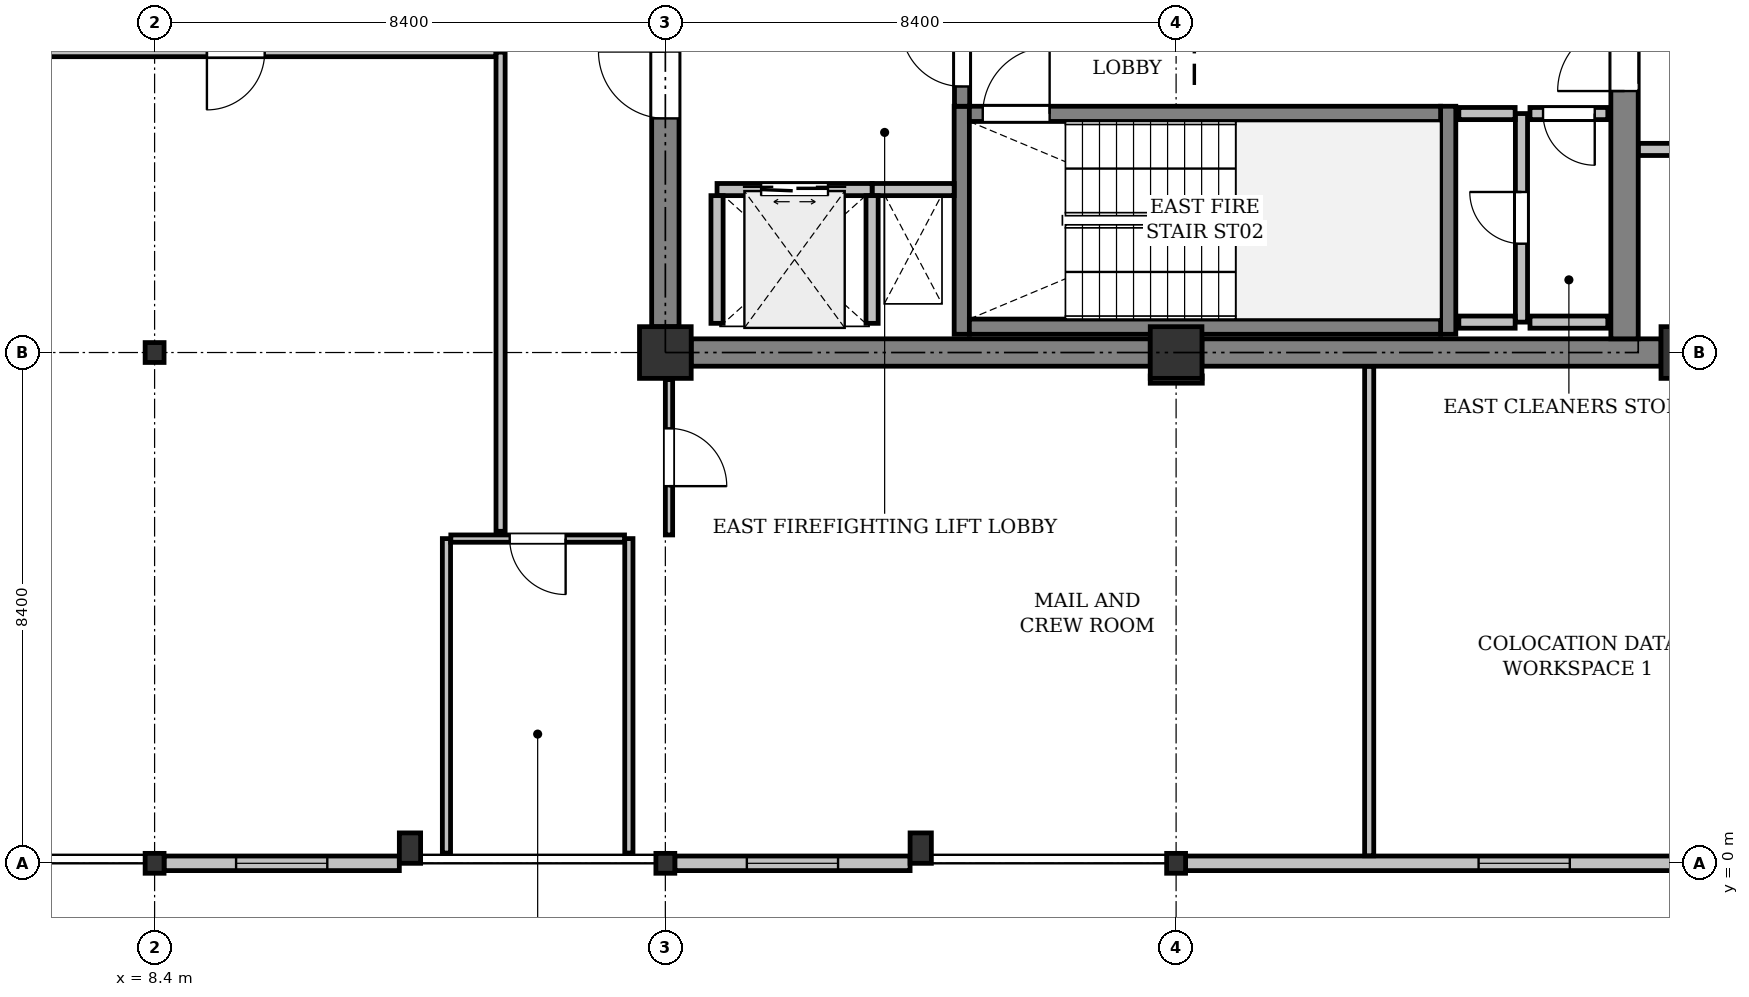
"""IFC4 building model, lengths in metres.
Left out: names, types, materials, properties, quantities, classifications, styles, units other than length and angle.
Written with IfcOpenShell. Run it as: python <this file> out.ifc"""

import sys

from ifc_helpers import new_model, si_unit, direction, frame, frame_2d, origin, origin_2d, place, context, subcontext, project, spatial, rectangle, i_section, extrude, element, fill, save


model = new_model("IFC4")
c1 = context("Model", 3, precision=1e-05, world=origin(), true_north=direction((0.0, 1.0)))
c2 = subcontext(c1, "Body", "Model", "MODEL_VIEW")
j1 = project(units=[si_unit("LENGTHUNIT", "METRE"), si_unit("PLANEANGLEUNIT", "RADIAN")], contexts=[c1])
p1 = place(None, origin())
s1 = spatial("IfcSite", under=j1, at=p1, CompositionType="ELEMENT")
p2 = place(p1, origin())
s2 = spatial("IfcBuilding", under=s1, at=p2, CompositionType="ELEMENT")
p3 = place(p2, frame((0.0, 0.0, 245.2)))
s3 = spatial("IfcBuildingStorey", under=s2, at=p3, CompositionType="ELEMENT", Elevation=245.2)
for number, where, z_axis, x_axis in (
    (1, (8.4, 0.0, 0.0), (0.0, 0.0, 1.0), (1.0, 0.0, 0.0)),
    (2, (8.4, 8.4, 0.0), (0.0, 0.0, 1.0), (1.0, 0.0, 0.0)),
    (3, (16.8, 0.0, 0.0), (0.0, 0.0, 1.0), (1.0, 0.0, 0.0)),
):
    element("IfcColumn", number, at=place(p3, frame(where, z_axis=z_axis, x_axis=x_axis)), inside=s3, PredefinedType="COLUMN", context=c2, shape_type="SweptSolid", body=[
        extrude(i_section(OverallWidth=0.35, OverallDepth=0.35, WebThickness=0.02, FlangeThickness=0.032, at=origin_2d()), origin(), (0.0, 0.0, 1.0), 5.0),
    ])
p4 = place(p3, frame((16.8, 8.4, 0.0), z_axis=(0.0, 0.0, 1.0), x_axis=(1.0, 0.0, 0.0)))
e4 = element("IfcColumn", 4, at=p4, inside=s3, PredefinedType="COLUMN", context=c2, shape_type="SweptSolid", body=[
    extrude(rectangle(XDim=1.0, YDim=1.0, at=origin_2d()), origin(), (0.0, 0.0, 1.0), 5.0),
])
p5 = place(p3, frame((25.2, 0.0, 0.0), z_axis=(0.0, 0.0, 1.0), x_axis=(1.0, 0.0, 0.0)))
e5 = element("IfcColumn", 5, at=p5, inside=s3, PredefinedType="COLUMN", context=c2, shape_type="SweptSolid", body=[
    extrude(i_section(OverallWidth=0.35, OverallDepth=0.35, WebThickness=0.02, FlangeThickness=0.032, at=origin_2d()), origin(), (0.0, 0.0, 1.0), 5.0),
])
for number, where, z_axis, x_axis in (
    (6, (25.2, 8.4, 0.0), (0.0, 0.0, 1.0), (1.0, 0.0, 0.0)),
    (7, (33.6, 8.4, 0.0), (0.0, 0.0, 1.0), (1.0, 0.0, 0.0)),
):
    element("IfcColumn", number, at=place(p3, frame(where, z_axis=z_axis, x_axis=x_axis)), inside=s3, PredefinedType="COLUMN", context=c2, shape_type="SweptSolid", body=[
        extrude(rectangle(XDim=1.0, YDim=1.0, at=origin_2d()), origin(), (0.0, 0.0, 1.0), 5.0),
    ])
for number, where, z_axis, x_axis in (
    (8, (12.6, 0.25, 0.0), (0.0, 0.0, 1.0), (1.0, 0.0, 0.0)),
    (9, (21.0, 0.25, 0.0), (0.0, 0.0, 1.0), (1.0, 0.0, 0.0)),
):
    element("IfcColumn", number, at=place(p3, frame(where, z_axis=z_axis, x_axis=x_axis)), inside=s3, PredefinedType="PILASTER", context=c2, shape_type="SweptSolid", body=[
        extrude(rectangle(XDim=0.35, YDim=0.5, at=origin_2d()), origin(), (0.0, 0.0, 1.0), 5.0),
    ])
p6 = place(p3, frame((33.425, 0.0, 0.0), z_axis=(0.0, 0.0, 1.0), x_axis=(-1.0, 0.0, 0.0)))
e10 = element("IfcWall", 10, at=p6, inside=s3, PredefinedType="STANDARD", context=c2, shape_type="SweptSolid", body=[
    extrude(rectangle(XDim=8.05, YDim=0.24, at=frame_2d((4.025, 0.0))), origin(), (0.0, 0.0, 1.0), 4.425),
])
for number, where, z_axis, x_axis in (
    (11, (25.025, 0.0, 0.0), (0.0, 0.0, 1.0), (-1.0, 0.0, 0.0)),
    (12, (20.825, 0.0, 0.0), (0.0, 0.0, 1.0), (-1.0, 0.0, 0.0)),
):
    element("IfcWall", number, at=place(p3, frame(where, z_axis=z_axis, x_axis=x_axis)), inside=s3, PredefinedType="STANDARD", context=c2, shape_type="SweptSolid", body=[
        extrude(rectangle(XDim=3.85, YDim=0.24, at=frame_2d((1.925, 0.0))), origin(), (0.0, 0.0, 1.0), 4.425),
    ])
for number, where, z_axis, x_axis in (
    (13, (16.625, 0.0, 0.0), (0.0, 0.0, 1.0), (-1.0, 0.0, 0.0)),
    (14, (12.425, 0.0, 0.0), (0.0, 0.0, 1.0), (-1.0, 0.0, 0.0)),
):
    element("IfcWall", number, at=place(p3, frame(where, z_axis=z_axis, x_axis=x_axis)), inside=s3, PredefinedType="STANDARD", context=c2, shape_type="SweptSolid", body=[
        extrude(rectangle(XDim=3.85, YDim=0.24, at=frame_2d((1.925, 0.0))), origin(), (0.0, 0.0, 1.0), 4.425),
    ])
p7 = place(p3, frame((8.225, 0.0, 0.0), z_axis=(0.0, 0.0, 1.0), x_axis=(-1.0, 0.0, 0.0)))
e15 = element("IfcWall", 15, at=p7, inside=s3, PredefinedType="STANDARD", context=c2, shape_type="SweptSolid", body=[
    extrude(rectangle(XDim=4.145, YDim=0.24, at=frame_2d((2.073, 0.0))), origin(), (0.0, 0.0, 1.0), 4.725),
])
p8 = place(p3, frame((17.3, 8.4, 0.0), z_axis=(0.0, 0.0, 1.0), x_axis=(1.0, 0.0, 0.0)))
e16 = element("IfcWall", 16, at=p8, inside=s3, PredefinedType="SHEAR", context=c2, shape_type="SweptSolid", body=[
    extrude(rectangle(XDim=7.4, YDim=0.45, at=frame_2d((3.7, 0.0))), origin(), (0.0, 0.0, 1.0), 4.725),
])
p9 = place(p3, frame((25.7, 8.4, 0.0), z_axis=(0.0, 0.0, 1.0), x_axis=(1.0, 0.0, 0.0)))
e17 = element("IfcWall", 17, at=p9, inside=s3, PredefinedType="SHEAR", context=c2, shape_type="SweptSolid", body=[
    extrude(rectangle(XDim=7.4, YDim=0.45, at=frame_2d((3.7, 0.0))), origin(), (0.0, 0.0, 1.0), 4.725),
])
p10 = place(p3, frame((32.575, 8.625, 0.0), z_axis=(0.0, 0.0, 1.0), x_axis=(0.0, 1.0, 0.0)))
e18 = element("IfcWall", 18, at=p10, inside=s3, PredefinedType="SHEAR", context=c2, shape_type="SweptSolid", body=[
    extrude(rectangle(XDim=7.95, YDim=0.45, at=frame_2d((3.975, 0.0))), origin(), (0.0, 0.0, 1.0), 4.725),
])
p11 = place(p10, frame((4.075, 0.0, 0.0)))
e19 = element("IfcOpeningElement", 19, at=p11, cuts=e18, PredefinedType="OPENING", context=c2, shape_type="SweptSolid", body=[
    extrude(rectangle(XDim=1.1, YDim=2.15, at=frame_2d((0.55, 1.075))), frame((0.0, 0.235, 0.0), z_axis=(0.0, -1.0, 0.0), x_axis=(1.0, 0.0, 0.0)), (0.0, 0.0, 1.0), 0.47),
])
p12 = place(p3, frame((16.8, 8.9, 0.0), z_axis=(0.0, 0.0, 1.0), x_axis=(0.0, 1.0, 0.0)))
e20 = element("IfcWall", 20, at=p12, inside=s3, PredefinedType="SHEAR", context=c2, shape_type="SweptSolid", body=[
    extrude(rectangle(XDim=7.4, YDim=0.45, at=frame_2d((3.7, 0.0))), origin(), (0.0, 0.0, 1.0), 4.725),
])
p13 = place(p12, frame((3.35, 0.0, 0.0)))
e21 = element("IfcOpeningElement", 21, at=p13, cuts=e20, PredefinedType="OPENING", context=c2, shape_type="SweptSolid", body=[
    extrude(rectangle(XDim=1.1, YDim=2.15, at=frame_2d((0.55, 1.075))), frame((0.0, 0.235, 0.0), z_axis=(0.0, -1.0, 0.0), x_axis=(1.0, 0.0, 0.0)), (0.0, 0.0, 1.0), 0.47),
])
for number, where, z_axis, x_axis in (
    (22, (21.675, 8.7, 0.0), (0.0, 0.0, 1.0), (0.0, 1.0, 0.0)),
    (23, (29.675, 8.7, 0.0), (0.0, 0.0, 1.0), (0.0, 1.0, 0.0)),
):
    element("IfcWall", number, at=place(p3, frame(where, z_axis=z_axis, x_axis=x_axis)), inside=s3, PredefinedType="SHEAR", context=c2, shape_type="SweptSolid", body=[
        extrude(rectangle(XDim=3.75, YDim=0.25, at=frame_2d((1.875, 0.0))), origin(), (0.0, 0.0, 1.0), 4.725),
    ])
p14 = place(p3, frame((21.8, 8.825, 0.0), z_axis=(0.0, 0.0, 1.0), x_axis=(1.0, 0.0, 0.0)))
e24 = element("IfcWall", 24, at=p14, inside=s3, PredefinedType="SHEAR", context=c2, shape_type="SweptSolid", body=[
    extrude(rectangle(XDim=7.75, YDim=0.25, at=frame_2d((3.875, 0.0))), origin(), (0.0, 0.0, 1.0), 4.725),
])
p15 = place(p3, frame((21.8, 12.325, 0.0), z_axis=(0.0, 0.0, 1.0), x_axis=(1.0, 0.0, 0.0)))
e25 = element("IfcWall", 25, at=p15, inside=s3, PredefinedType="SHEAR", context=c2, shape_type="SweptSolid", body=[
    extrude(rectangle(XDim=7.75, YDim=0.25, at=frame_2d((3.875, 0.0))), origin(), (0.0, 0.0, 1.0), 4.725),
])
p16 = place(p15, frame((0.22, 0.0, 0.0)))
e26 = element("IfcOpeningElement", 26, at=p16, cuts=e25, PredefinedType="OPENING", context=c2, shape_type="SweptSolid", body=[
    extrude(rectangle(XDim=1.1, YDim=2.15, at=frame_2d((0.55, 1.075))), frame((0.0, 0.135, 0.0), z_axis=(0.0, -1.0, 0.0), x_axis=(1.0, 0.0, 0.0)), (0.0, 0.0, 1.0), 0.27),
])
p17 = place(p3, frame((20.2, 11.08, 0.0), z_axis=(0.0, 0.0, 1.0), x_axis=(1.0, 0.0, 0.0)))
e27 = element("IfcWall", 27, at=p17, inside=s3, PredefinedType="PARTITIONING", context=c2, shape_type="SweptSolid", body=[
    extrude(rectangle(XDim=1.35, YDim=0.2, at=frame_2d((0.675, 0.0))), origin(), (0.0, 0.0, 1.0), 4.725),
])
p18 = place(p3, frame((21.68, 12.45, 0.0), z_axis=(0.0, 0.0, 1.0), x_axis=(0.0, 1.0, 0.0)))
e28 = element("IfcWall", 28, at=p18, inside=s3, PredefinedType="SHEAR", context=c2, shape_type="SweptSolid", body=[
    extrude(rectangle(XDim=1.65, YDim=0.25, at=frame_2d((0.825, 0.0))), origin(), (0.0, 0.0, 1.0), 4.725),
])
p19 = place(p18, frame((0.325, 0.0, 0.0)))
e29 = element("IfcOpeningElement", 29, at=p19, cuts=e28, PredefinedType="OPENING", context=c2, shape_type="SweptSolid", body=[
    extrude(rectangle(XDim=1.0, YDim=2.15, at=frame_2d((0.5, 1.075))), frame((0.0, 0.135, 0.0), z_axis=(0.0, -1.0, 0.0), x_axis=(1.0, 0.0, 0.0)), (0.0, 0.0, 1.0), 0.27),
])
p20 = place(p3, frame((17.65, 11.08, 0.0), z_axis=(0.0, 0.0, 1.0), x_axis=(1.0, 0.0, 0.0)))
e30 = element("IfcWall", 30, at=p20, inside=s3, PredefinedType="PARTITIONING", context=c2, shape_type="SweptSolid", body=[
    extrude(rectangle(XDim=2.55, YDim=0.2, at=frame_2d((1.275, 0.0))), origin(), (0.0, 0.0, 1.0), 4.725),
])
p21 = place(p20, frame((0.725, 0.0, 0.0)))
e31 = element("IfcOpeningElement", 31, at=p21, cuts=e30, PredefinedType="OPENING", context=c2, shape_type="SweptSolid", body=[
    extrude(rectangle(XDim=1.1, YDim=2.2, at=frame_2d((0.55, 1.1))), frame((0.0, 0.11, 0.0), z_axis=(0.0, -1.0, 0.0), x_axis=(1.0, 0.0, 0.0)), (0.0, 0.0, 1.0), 0.22),
])
for number, where, z_axis, x_axis in (
    (32, (20.2, 8.88, 0.0), (0.0, 0.0, 1.0), (0.0, 1.0, 0.0)),
    (33, (17.65, 8.88, 0.0), (0.0, 0.0, 1.0), (0.0, 1.0, 0.0)),
):
    element("IfcWall", number, at=place(p3, frame(where, z_axis=z_axis, x_axis=x_axis)), inside=s3, PredefinedType="PARTITIONING", context=c2, shape_type="SweptSolid", body=[
        extrude(rectangle(XDim=2.1, YDim=0.2, at=frame_2d((1.05, 0.0))), origin(), (0.0, 0.0, 1.0), 4.725),
    ])
p22 = place(p3, frame((32.3, 12.33, 0.0), z_axis=(0.0, 0.0, 1.0), x_axis=(-1.0, 0.0, 0.0)))
e34 = element("IfcWall", 34, at=p22, inside=s3, PredefinedType="PARTITIONING", context=c2, shape_type="SweptSolid", body=[
    extrude(rectangle(XDim=2.45, YDim=0.2, at=frame_2d((1.225, 0.0))), origin(), (0.0, 0.0, 1.0), 4.725),
])
p23 = place(p22, frame((0.8, 0.0, 0.0)))
e35 = element("IfcOpeningElement", 35, at=p23, cuts=e34, PredefinedType="OPENING", context=c2, shape_type="SweptSolid", body=[
    extrude(rectangle(XDim=0.85, YDim=2.15, at=frame_2d((0.425, 1.075))), frame((0.0, 0.11, 0.0), z_axis=(0.0, -1.0, 0.0), x_axis=(1.0, 0.0, 0.0)), (0.0, 0.0, 1.0), 0.22),
])
p24 = place(p3, frame((29.85, 8.9, 0.0), z_axis=(0.0, 0.0, 1.0), x_axis=(1.0, 0.0, 0.0)))
e36 = element("IfcWall", 36, at=p24, inside=s3, PredefinedType="PARTITIONING", context=c2, shape_type="SweptSolid", body=[
    extrude(rectangle(XDim=2.45, YDim=0.2, at=frame_2d((1.225, 0.0))), origin(), (0.0, 0.0, 1.0), 4.725),
])
p25 = place(p3, frame((14.312, 0.124, 0.0), z_axis=(0.0, 0.0, 1.0), x_axis=(0.0, 1.0, 0.0)))
e37 = element("IfcWall", 37, at=p25, inside=s3, PredefinedType="PARTITIONING", context=c2, shape_type="SweptSolid", body=[
    extrude(rectangle(XDim=5.216, YDim=0.2, at=frame_2d((2.608, 0.0))), origin(), (0.0, 0.0, 1.0), 4.725),
])
p26 = place(p3, frame((14.208, 5.34, 0.0), z_axis=(0.0, 0.0, 1.0), x_axis=(-1.0, 0.0, 0.0)))
e38 = element("IfcWall", 38, at=p26, inside=s3, PredefinedType="PARTITIONING", context=c2, shape_type="SweptSolid", body=[
    extrude(rectangle(XDim=8.808, YDim=0.2, at=frame_2d((4.404, 0.0))), origin(), (0.0, 0.0, 1.0), 3.709),
])
p27 = place(p3, frame((35.6, 5.34, 0.0), z_axis=(0.0, 0.0, 1.0), x_axis=(-1.0, 0.0, 0.0)))
e39 = element("IfcWall", 39, at=p27, inside=s3, PredefinedType="PARTITIONING", context=c2, shape_type="SweptSolid", body=[
    extrude(rectangle(XDim=7.494, YDim=0.2, at=frame_2d((3.747, 0.0))), origin(), (0.0, 0.0, 1.0), 3.709),
])
p28 = place(p3, frame((28.106, 5.236, 0.0), z_axis=(0.0, 0.0, 1.0), x_axis=(0.0, -1.0, 0.0)))
e40 = element("IfcWall", 40, at=p28, inside=s3, PredefinedType="PARTITIONING", context=c2, shape_type="SweptSolid", body=[
    extrude(rectangle(XDim=5.112, YDim=0.2, at=frame_2d((2.556, 0.0))), origin(), (0.0, 0.0, 1.0), 4.725),
])
p29 = place(p3, frame((28.086, 5.34, 0.0), z_axis=(0.0, 0.0, 1.0), x_axis=(-1.0, 0.0, 0.0)))
e41 = element("IfcWall", 41, at=p29, inside=s3, PredefinedType="PARTITIONING", context=c2, shape_type="SweptSolid", body=[
    extrude(rectangle(XDim=13.67, YDim=0.2, at=frame_2d((6.835, 0.0))), origin(), (0.0, 0.0, 1.0), 3.709),
])
p30 = place(p29, frame((6.335, 0.0, 0.0)))
e42 = element("IfcOpeningElement", 42, at=p30, cuts=e41, PredefinedType="OPENING", context=c2, shape_type="SweptSolid", body=[
    extrude(rectangle(XDim=1.0, YDim=2.15, at=frame_2d((0.5, 1.075))), frame((0.0, 0.11, 0.0), z_axis=(0.0, -1.0, 0.0), x_axis=(1.0, 0.0, 0.0)), (0.0, 0.0, 1.0), 0.22),
])
p31 = place(p3, frame((14.09, 11.052, 0.0), z_axis=(0.0, 0.0, 1.0), x_axis=(-1.0, 0.0, 0.0)))
e43 = element("IfcWall", 43, at=p31, inside=s3, PredefinedType="PARTITIONING", context=c2, shape_type="SweptSolid", body=[
    extrude(rectangle(XDim=6.38, YDim=0.2, at=frame_2d((3.19, 0.0))), origin(), (0.0, 0.0, 1.0), 3.709),
])
p32 = place(p3, frame((7.71, 10.948, 0.0), z_axis=(0.0, 0.0, 1.0), x_axis=(0.0, -1.0, 0.0)))
e44 = element("IfcWall", 44, at=p32, inside=s3, PredefinedType="PARTITIONING", context=c2, shape_type="SweptSolid", body=[
    extrude(rectangle(XDim=3.238, YDim=0.2, at=frame_2d((1.619, 0.0))), origin(), (0.0, 0.0, 1.0), 3.825),
])
p33 = place(p3, frame((7.814, 7.71, 0.0), z_axis=(0.0, 0.0, 1.0), x_axis=(1.0, 0.0, 0.0)))
e45 = element("IfcWall", 45, at=p33, inside=s3, PredefinedType="PARTITIONING", context=c2, shape_type="SweptSolid", body=[
    extrude(rectangle(XDim=6.276, YDim=0.2, at=frame_2d((3.138, 0.0))), origin(), (0.0, 0.0, 1.0), 3.709),
])
p34 = place(p33, frame((2.638, 0.0, 0.0)))
e46 = element("IfcOpeningElement", 46, at=p34, cuts=e45, PredefinedType="OPENING", context=c2, shape_type="SweptSolid", body=[
    extrude(rectangle(XDim=1.0, YDim=2.15, at=frame_2d((0.5, 1.075))), frame((0.0, 0.11, 0.0), z_axis=(0.0, -1.0, 0.0), x_axis=(1.0, 0.0, 0.0)), (0.0, 0.0, 1.0), 0.22),
])
p35 = place(p3, frame((14.09, 7.814, 0.0), z_axis=(0.0, 0.0, 1.0), x_axis=(0.0, 1.0, 0.0)))
e47 = element("IfcWall", 47, at=p35, inside=s3, PredefinedType="PARTITIONING", context=c2, shape_type="SweptSolid", body=[
    extrude(rectangle(XDim=3.134, YDim=0.2, at=frame_2d((1.567, 0.0))), origin(), (0.0, 0.0, 1.0), 3.825),
])
p36 = place(p3, frame((7.71, 14.192, 0.0), z_axis=(0.0, 0.0, 1.0), x_axis=(0.0, -1.0, 0.0)))
e48 = element("IfcWall", 48, at=p36, inside=s3, PredefinedType="PARTITIONING", context=c2, shape_type="SweptSolid", body=[
    extrude(rectangle(XDim=3.036, YDim=0.2, at=frame_2d((1.518, 0.0))), origin(), (0.0, 0.0, 1.0), 4.725),
])
p37 = place(p36, frame((1.018, 0.0, 0.0)))
e49 = element("IfcOpeningElement", 49, at=p37, cuts=e48, PredefinedType="OPENING", context=c2, shape_type="SweptSolid", body=[
    extrude(rectangle(XDim=1.0, YDim=2.15, at=frame_2d((0.5, 1.075))), frame((0.0, 0.11, 0.0), z_axis=(0.0, -1.0, 0.0), x_axis=(1.0, 0.0, 0.0)), (0.0, 0.0, 1.0), 0.22),
])
p38 = place(p3, frame((14.09, 11.156, 0.0), z_axis=(0.0, 0.0, 1.0), x_axis=(0.0, 1.0, 0.0)))
e50 = element("IfcWall", 50, at=p38, inside=s3, PredefinedType="PARTITIONING", context=c2, shape_type="SweptSolid", body=[
    extrude(rectangle(XDim=3.036, YDim=0.2, at=frame_2d((1.518, 0.0))), origin(), (0.0, 0.0, 1.0), 4.725),
])
p39 = place(p11, origin())
e51 = element("IfcDoor", 51, at=p39, inside=s3, OperationType="SINGLE_SWING_RIGHT", PredefinedType="DOOR", context=c2, shape_type="SweptSolid", body=[
    extrude(rectangle(XDim=1.1, YDim=2.15, at=frame_2d((0.55, 1.075))), frame((0.0, 0.025, 0.0), z_axis=(0.0, -1.0, 0.0), x_axis=(1.0, 0.0, 0.0)), (0.0, 0.0, 1.0), 0.05),
])
fill(e19, e51)
p40 = place(p13, origin())
e52 = element("IfcDoor", 52, at=p40, inside=s3, OperationType="SINGLE_SWING_LEFT", PredefinedType="DOOR", context=c2, shape_type="SweptSolid", body=[
    extrude(rectangle(XDim=1.1, YDim=2.15, at=frame_2d((0.55, 1.075))), frame((0.0, 0.025, 0.0), z_axis=(0.0, -1.0, 0.0), x_axis=(1.0, 0.0, 0.0)), (0.0, 0.0, 1.0), 0.05),
])
fill(e21, e52)
p41 = place(p16, origin())
e53 = element("IfcDoor", 53, at=p41, inside=s3, OperationType="SINGLE_SWING_LEFT", PredefinedType="DOOR", context=c2, shape_type="SweptSolid", body=[
    extrude(rectangle(XDim=1.1, YDim=2.15, at=frame_2d((0.55, 1.075))), frame((0.0, 0.025, 0.0), z_axis=(0.0, -1.0, 0.0), x_axis=(1.0, 0.0, 0.0)), (0.0, 0.0, 1.0), 0.05),
])
fill(e26, e53)
p42 = place(p19, origin())
e54 = element("IfcDoor", 54, at=p42, inside=s3, OperationType="SINGLE_SWING_LEFT", PredefinedType="DOOR", context=c2, shape_type="SweptSolid", body=[
    extrude(rectangle(XDim=1.0, YDim=2.15, at=frame_2d((0.5, 1.075))), frame((0.0, 0.025, 0.0), z_axis=(0.0, -1.0, 0.0), x_axis=(1.0, 0.0, 0.0)), (0.0, 0.0, 1.0), 0.05),
])
fill(e29, e54)
p43 = place(p21, origin())
e55 = element("IfcDoor", 55, at=p43, inside=s3, OperationType="DOUBLE_DOOR_SLIDING", PredefinedType="DOOR", context=c2, shape_type="SweptSolid", body=[
    extrude(rectangle(XDim=1.1, YDim=2.2, at=frame_2d((0.55, 1.1))), frame((0.0, 0.025, 0.0), z_axis=(0.0, -1.0, 0.0), x_axis=(1.0, 0.0, 0.0)), (0.0, 0.0, 1.0), 0.05),
])
fill(e31, e55)
p44 = place(p23, origin())
e56 = element("IfcDoor", 56, at=p44, inside=s3, OperationType="SINGLE_SWING_LEFT", PredefinedType="DOOR", context=c2, shape_type="SweptSolid", body=[
    extrude(rectangle(XDim=0.85, YDim=2.15, at=frame_2d((0.425, 1.075))), frame((0.0, 0.025, 0.0), z_axis=(0.0, -1.0, 0.0), x_axis=(1.0, 0.0, 0.0)), (0.0, 0.0, 1.0), 0.05),
])
fill(e35, e56)
p45 = place(p30, origin())
e57 = element("IfcDoor", 57, at=p45, inside=s3, OperationType="SINGLE_SWING_LEFT", PredefinedType="DOOR", context=c2, shape_type="SweptSolid", body=[
    extrude(rectangle(XDim=1.0, YDim=2.15, at=frame_2d((0.5, 1.075))), frame((0.0, 0.025, 0.0), z_axis=(0.0, -1.0, 0.0), x_axis=(1.0, 0.0, 0.0)), (0.0, 0.0, 1.0), 0.05),
])
fill(e42, e57)
p46 = place(p34, origin())
e58 = element("IfcDoor", 58, at=p46, inside=s3, OperationType="SINGLE_SWING_RIGHT", PredefinedType="DOOR", context=c2, shape_type="SweptSolid", body=[
    extrude(rectangle(XDim=1.0, YDim=2.15, at=frame_2d((0.5, 1.075))), frame((0.0, 0.025, 0.0), z_axis=(0.0, -1.0, 0.0), x_axis=(1.0, 0.0, 0.0)), (0.0, 0.0, 1.0), 0.05),
])
fill(e46, e58)
p47 = place(p37, origin())
e59 = element("IfcDoor", 59, at=p47, inside=s3, OperationType="SINGLE_SWING_LEFT", PredefinedType="DOOR", context=c2, shape_type="SweptSolid", body=[
    extrude(rectangle(XDim=1.0, YDim=2.15, at=frame_2d((0.5, 1.075))), frame((0.0, 0.025, 0.0), z_axis=(0.0, -1.0, 0.0), x_axis=(1.0, 0.0, 0.0)), (0.0, 0.0, 1.0), 0.05),
])
fill(e49, e59)
save(model, sys.argv[1])
